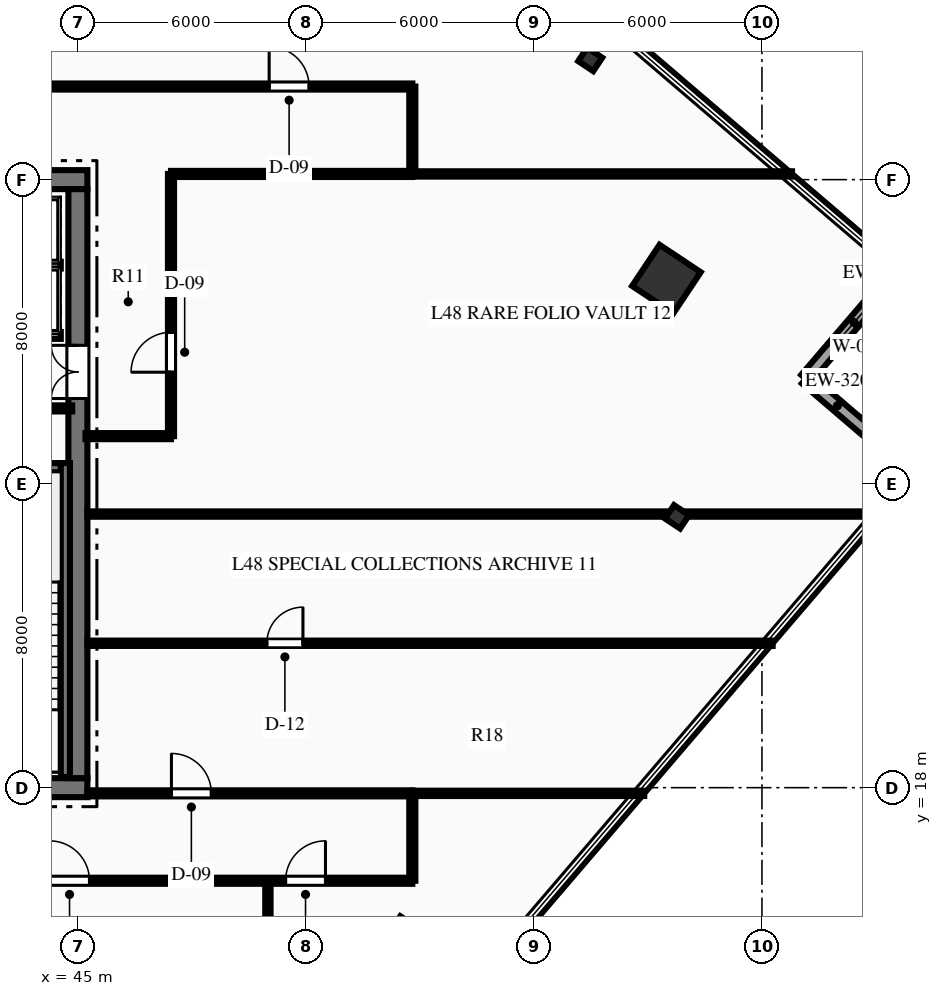
"""IFC4 building model, lengths in metres.
Left out: names, types, materials, properties, quantities, classifications, styles, units other than length and angle.
Written with IfcOpenShell. Run it as: python <this file> out.ifc"""

import sys

from ifc_helpers import new_model, si_unit, direction, frame, frame_2d, origin, origin_2d, place, context, subcontext, project, spatial, rectangle, hollow_rectangle, i_section, extrude, element, fill, save


model = new_model("IFC4")
c1 = context("Model", 3, precision=1e-05, world=origin(), true_north=direction((0.0, 1.0)))
c2 = subcontext(c1, "Body", "Model", "MODEL_VIEW")
j1 = project(units=[si_unit("LENGTHUNIT", "METRE"), si_unit("PLANEANGLEUNIT", "RADIAN")], contexts=[c1])
p1 = place(None, origin())
s1 = spatial("IfcSite", under=j1, at=p1, CompositionType="ELEMENT")
p2 = place(p1, origin())
s2 = spatial("IfcBuilding", under=s1, at=p2, CompositionType="ELEMENT")
p3 = place(p2, frame((0.0, 0.0, 193.95)))
s3 = spatial("IfcBuildingStorey", under=s2, at=p3, CompositionType="ELEMENT", Elevation=193.95)
p4 = place(p3, frame((26.75, 18.0, 0.0), z_axis=(0.0, 0.0, 1.0), x_axis=(1.0, 0.0, 0.0)))
e1 = element("IfcWall", 1, at=p4, inside=s3, PredefinedType="SHEAR", context=c2, shape_type="SweptSolid", body=[
    extrude(rectangle(XDim=18.5, YDim=0.5, at=frame_2d((9.25, 0.0))), origin(), (0.0, 0.0, 1.0), 4.5),
])
p5 = place(p4, frame((7.35, 0.0, 0.0)))
e2 = element("IfcOpeningElement", 2, at=p5, cuts=e1, PredefinedType="OPENING", context=c2, shape_type="SweptSolid", body=[
    extrude(rectangle(XDim=1.1, YDim=2.15, at=frame_2d((0.55, 1.075))), frame((0.0, 0.26, 0.0), z_axis=(0.0, -1.0, 0.0), x_axis=(1.0, 0.0, 0.0)), (0.0, 0.0, 1.0), 0.52),
])
p6 = place(p4, frame((10.05, 0.0, 0.0)))
e3 = element("IfcOpeningElement", 3, at=p6, cuts=e1, PredefinedType="OPENING", context=c2, shape_type="SweptSolid", body=[
    extrude(rectangle(XDim=1.1, YDim=2.15, at=frame_2d((0.55, 1.075))), frame((0.0, 0.26, 0.0), z_axis=(0.0, -1.0, 0.0), x_axis=(1.0, 0.0, 0.0)), (0.0, 0.0, 1.0), 0.52),
])
p7 = place(p3, frame((26.75, 34.0, 0.0), z_axis=(0.0, 0.0, 1.0), x_axis=(1.0, 0.0, 0.0)))
e4 = element("IfcWall", 4, at=p7, inside=s3, PredefinedType="SHEAR", context=c2, shape_type="SweptSolid", body=[
    extrude(rectangle(XDim=18.5, YDim=0.5, at=frame_2d((9.25, 0.0))), origin(), (0.0, 0.0, 1.0), 4.5),
])
p8 = place(p7, frame((13.935, 0.0, 0.0)))
e5 = element("IfcOpeningElement", 5, at=p8, cuts=e4, PredefinedType="OPENING", context=c2, shape_type="SweptSolid", body=[
    extrude(rectangle(XDim=1.1, YDim=2.15, at=frame_2d((0.55, 1.075))), frame((0.0, 0.26, 0.0), z_axis=(0.0, -1.0, 0.0), x_axis=(1.0, 0.0, 0.0)), (0.0, 0.0, 1.0), 0.52),
])
p9 = place(p7, frame((16.185, 0.0, 0.0)))
e6 = element("IfcOpeningElement", 6, at=p9, cuts=e4, PredefinedType="OPENING", context=c2, shape_type="SweptSolid", body=[
    extrude(rectangle(XDim=1.1, YDim=2.15, at=frame_2d((0.55, 1.075))), frame((0.0, 0.26, 0.0), z_axis=(0.0, -1.0, 0.0), x_axis=(1.0, 0.0, 0.0)), (0.0, 0.0, 1.0), 0.52),
])
p10 = place(p3, frame((45.0, 18.25, 0.0), z_axis=(0.0, 0.0, 1.0), x_axis=(0.0, 1.0, 0.0)))
e7 = element("IfcWall", 7, at=p10, inside=s3, PredefinedType="SHEAR", context=c2, shape_type="SweptSolid", body=[
    extrude(rectangle(XDim=15.5, YDim=0.5, at=frame_2d((7.75, 0.0))), origin(), (0.0, 0.0, 1.0), 4.5),
])
p11 = place(p10, frame((9.99, 0.0, 0.0)))
e8 = element("IfcOpeningElement", 8, at=p11, cuts=e7, PredefinedType="OPENING", context=c2, shape_type="SweptSolid", body=[
    extrude(rectangle(XDim=1.4, YDim=2.2, at=frame_2d((0.7, 1.1))), frame((0.0, 0.26, 0.0), z_axis=(0.0, -1.0, 0.0), x_axis=(1.0, 0.0, 0.0)), (0.0, 0.0, 1.0), 0.52),
])
p12 = place(p3, frame((40.81, 26.42, 0.0), z_axis=(0.0, 0.0, 1.0), x_axis=(1.0, 0.0, 0.0)))
e9 = element("IfcWall", 9, at=p12, inside=s3, PredefinedType="SHEAR", context=c2, shape_type="SweptSolid", body=[
    extrude(rectangle(XDim=3.98, YDim=0.24, at=frame_2d((1.99, 0.0))), origin(), (0.0, 0.0, 1.0), 4.5),
])
p13 = place(p3, frame((44.67, 18.28, 0.0), z_axis=(0.0, 0.0, 1.0), x_axis=(0.0, 1.0, 0.0)))
e10 = element("IfcWall", 10, at=p13, inside=s3, PredefinedType="SHEAR", context=c2, shape_type="SweptSolid", body=[
    extrude(rectangle(XDim=8.26, YDim=0.24, at=frame_2d((4.13, 0.0))), origin(), (0.0, 0.0, 1.0), 4.5),
])
p14 = place(p3, frame((60.486, 31.384, 0.0), z_axis=(0.0, 0.0, 1.0), x_axis=(0.554118199338, 0.832437998389, 0.0)))
e11 = element("IfcColumn", 11, at=p14, inside=s3, PredefinedType="COLUMN", context=c2, shape_type="SweptSolid", body=[
    extrude(hollow_rectangle(XDim=1.3, YDim=1.3, WallThickness=0.06, at=origin_2d()), origin(), (0.0, 0.0, 1.0), 4.5),
])
for number, where, z_axis, x_axis in (
    (12, (60.766, 25.126, 0.0), (0.0, 0.0, 1.0), (0.554, 0.832, 0.0)),
    (13, (58.481, 37.164, 0.0), (0.0, 0.0, 1.0), (0.554, 0.832, 0.0)),
):
    element("IfcColumn", number, at=place(p3, frame(where, z_axis=z_axis, x_axis=x_axis)), inside=s3, PredefinedType="COLUMN", context=c2, shape_type="SweptSolid", body=[
        extrude(i_section(OverallWidth=0.424, OverallDepth=0.474, WebThickness=0.048, FlangeThickness=0.077, at=origin_2d()), origin(), (0.0, 0.0, 1.0), 4.5),
    ])
p15 = place(p3, frame((64.155, 28.759, 0.0), z_axis=(0.0, 0.0, 1.0), x_axis=(0.759844000319, -0.650105449276, 0.0)))
e14 = element("IfcWall", 14, at=p15, inside=s3, PredefinedType="STANDARD", context=c2, shape_type="SweptSolid", body=[
    extrude(rectangle(XDim=3.9, YDim=0.32, at=frame_2d((1.95, 0.0))), origin(), (0.0, 0.0, 1.0), 4.22),
])
p16 = place(p3, frame((66.69, 31.722, 0.0), z_axis=(0.0, 0.0, 1.0), x_axis=(-0.650105449276, -0.759844000319, 0.0)))
e15 = element("IfcWall", 15, at=p16, inside=s3, PredefinedType="STANDARD", context=c2, shape_type="SweptSolid", body=[
    extrude(rectangle(XDim=3.9, YDim=0.32, at=frame_2d((1.95, 0.0))), origin(), (0.0, 0.0, 1.0), 4.22),
])
p17 = place(p16, frame((1.1, 0.0, 0.75)))
e16 = element("IfcOpeningElement", 16, at=p17, cuts=e15, PredefinedType="OPENING", context=c2, shape_type="SweptSolid", body=[
    extrude(rectangle(XDim=1.7, YDim=2.5, at=frame_2d((0.85, 1.25))), frame((0.0, 0.17, 0.0), z_axis=(0.0, -1.0, 0.0), x_axis=(1.0, 0.0, 0.0)), (0.0, 0.0, 1.0), 0.34),
])
p18 = place(p3, frame((40.8, 27.98, 0.0), z_axis=(0.0, 0.0, 1.0), x_axis=(1.0, 0.0, 0.0)))
e17 = element("IfcWall", 17, at=p18, inside=s3, PredefinedType="PARTITIONING", context=c2, shape_type="SweptSolid", body=[
    extrude(rectangle(XDim=4.05, YDim=0.16, at=frame_2d((2.025, 0.0))), origin(), (0.0, 0.0, 1.0), 4.22),
])
p19 = place(p18, frame((0.407, 0.0, 0.0)))
e18 = element("IfcOpeningElement", 18, at=p19, cuts=e17, PredefinedType="OPENING", context=c2, shape_type="SweptSolid", body=[
    extrude(rectangle(XDim=0.9, YDim=2.15, at=frame_2d((0.45, 1.075))), frame((0.0, 0.09, 0.0), z_axis=(0.0, -1.0, 0.0), x_axis=(1.0, 0.0, 0.0)), (0.0, 0.0, 1.0), 0.18),
])
p20 = place(p18, frame((2.2, 0.0, 0.0)))
e19 = element("IfcOpeningElement", 19, at=p20, cuts=e17, PredefinedType="OPENING", context=c2, shape_type="SweptSolid", body=[
    extrude(rectangle(XDim=0.9, YDim=2.15, at=frame_2d((0.45, 1.075))), frame((0.0, 0.09, 0.0), z_axis=(0.0, -1.0, 0.0), x_axis=(1.0, 0.0, 0.0)), (0.0, 0.0, 1.0), 0.18),
])
p21 = place(p3, frame((40.12, 29.9, 0.0), z_axis=(0.0, 0.0, 1.0), x_axis=(1.0, 0.0, 0.0)))
e20 = element("IfcWall", 20, at=p21, inside=s3, PredefinedType="PARTITIONING", context=c2, shape_type="SweptSolid", body=[
    extrude(rectangle(XDim=4.43, YDim=0.18, at=frame_2d((2.215, 0.0))), origin(), (0.0, 0.0, 1.0), 4.22),
])
p22 = place(p21, frame((0.565, 0.0, 0.0)))
e21 = element("IfcOpeningElement", 21, at=p22, cuts=e20, PredefinedType="OPENING", context=c2, shape_type="SweptSolid", body=[
    extrude(rectangle(XDim=1.1, YDim=2.15, at=frame_2d((0.55, 1.075))), frame((0.0, 0.1, 0.0), z_axis=(0.0, -1.0, 0.0), x_axis=(1.0, 0.0, 0.0)), (0.0, 0.0, 1.0), 0.2),
])
p23 = place(p21, frame((2.815, 0.0, 0.0)))
e22 = element("IfcOpeningElement", 22, at=p23, cuts=e20, PredefinedType="OPENING", context=c2, shape_type="SweptSolid", body=[
    extrude(rectangle(XDim=1.1, YDim=2.15, at=frame_2d((0.55, 1.075))), frame((0.0, 0.1, 0.0), z_axis=(0.0, -1.0, 0.0), x_axis=(1.0, 0.0, 0.0)), (0.0, 0.0, 1.0), 0.2),
])
p24 = place(p3, frame((40.12, 31.75, 0.0), z_axis=(0.0, 0.0, 1.0), x_axis=(1.0, 0.0, 0.0)))
e23 = element("IfcWall", 23, at=p24, inside=s3, PredefinedType="PARTITIONING", context=c2, shape_type="SweptSolid", body=[
    extrude(rectangle(XDim=4.43, YDim=0.18, at=frame_2d((2.215, 0.0))), origin(), (0.0, 0.0, 1.0), 4.22),
])
p25 = place(p3, frame((18.2, 15.55, 0.0), z_axis=(0.0, 0.0, 1.0), x_axis=(1.0, 0.0, 0.0)))
e24 = element("IfcWall", 24, at=p25, inside=s3, PredefinedType="PARTITIONING", context=c2, shape_type="SweptSolid", body=[
    extrude(rectangle(XDim=35.6, YDim=0.16, at=frame_2d((17.8, 0.0))), origin(), (0.0, 0.0, 1.0), 3.599),
])
p26 = place(p25, frame((2.625, 0.0, 0.0)))
e25 = element("IfcOpeningElement", 25, at=p26, cuts=e24, PredefinedType="OPENING", context=c2, shape_type="SweptSolid", body=[
    extrude(rectangle(XDim=1.05, YDim=2.15, at=frame_2d((0.525, 1.075))), frame((0.0, 0.09, 0.0), z_axis=(0.0, -1.0, 0.0), x_axis=(1.0, 0.0, 0.0)), (0.0, 0.0, 1.0), 0.18),
])
p27 = place(p25, frame((9.335, 0.0, 0.0)))
e26 = element("IfcOpeningElement", 26, at=p27, cuts=e24, PredefinedType="OPENING", context=c2, shape_type="SweptSolid", body=[
    extrude(rectangle(XDim=1.05, YDim=2.15, at=frame_2d((0.525, 1.075))), frame((0.0, 0.09, 0.0), z_axis=(0.0, -1.0, 0.0), x_axis=(1.0, 0.0, 0.0)), (0.0, 0.0, 1.0), 0.18),
])
p28 = place(p25, frame((17.775, 0.0, 0.0)))
e27 = element("IfcOpeningElement", 27, at=p28, cuts=e24, PredefinedType="OPENING", context=c2, shape_type="SweptSolid", body=[
    extrude(rectangle(XDim=1.05, YDim=2.15, at=frame_2d((0.525, 1.075))), frame((0.0, 0.09, 0.0), z_axis=(0.0, -1.0, 0.0), x_axis=(1.0, 0.0, 0.0)), (0.0, 0.0, 1.0), 0.18),
])
p29 = place(p25, frame((26.055, 0.0, 0.0)))
e28 = element("IfcOpeningElement", 28, at=p29, cuts=e24, PredefinedType="OPENING", context=c2, shape_type="SweptSolid", body=[
    extrude(rectangle(XDim=1.05, YDim=2.15, at=frame_2d((0.525, 1.075))), frame((0.0, 0.09, 0.0), z_axis=(0.0, -1.0, 0.0), x_axis=(1.0, 0.0, 0.0)), (0.0, 0.0, 1.0), 0.18),
])
p30 = place(p25, frame((32.265, 0.0, 0.0)))
e29 = element("IfcOpeningElement", 29, at=p30, cuts=e24, PredefinedType="OPENING", context=c2, shape_type="SweptSolid", body=[
    extrude(rectangle(XDim=1.05, YDim=2.15, at=frame_2d((0.525, 1.075))), frame((0.0, 0.09, 0.0), z_axis=(0.0, -1.0, 0.0), x_axis=(1.0, 0.0, 0.0)), (0.0, 0.0, 1.0), 0.18),
])
p31 = place(p3, frame((45.25, 17.85, 0.0), z_axis=(0.0, 0.0, 1.0), x_axis=(1.0, 0.0, 0.0)))
e30 = element("IfcWall", 30, at=p31, inside=s3, PredefinedType="PARTITIONING", context=c2, shape_type="SweptSolid", body=[
    extrude(rectangle(XDim=8.55, YDim=0.16, at=frame_2d((4.275, 0.0))), origin(), (0.0, 0.0, 1.0), 4.22),
])
p32 = place(p31, frame((2.211, 0.0, 0.0)))
e31 = element("IfcOpeningElement", 31, at=p32, cuts=e30, PredefinedType="OPENING", context=c2, shape_type="SweptSolid", body=[
    extrude(rectangle(XDim=1.05, YDim=2.15, at=frame_2d((0.525, 1.075))), frame((0.0, 0.09, 0.0), z_axis=(0.0, -1.0, 0.0), x_axis=(1.0, 0.0, 0.0)), (0.0, 0.0, 1.0), 0.18),
])
p33 = place(p3, frame((18.2, 36.45, 0.0), z_axis=(0.0, 0.0, 1.0), x_axis=(1.0, 0.0, 0.0)))
e32 = element("IfcWall", 32, at=p33, inside=s3, PredefinedType="PARTITIONING", context=c2, shape_type="SweptSolid", body=[
    extrude(rectangle(XDim=35.6, YDim=0.16, at=frame_2d((17.8, 0.0))), origin(), (0.0, 0.0, 1.0), 3.599),
])
p34 = place(p33, frame((7.55, 0.0, 0.0)))
e33 = element("IfcOpeningElement", 33, at=p34, cuts=e32, PredefinedType="OPENING", context=c2, shape_type="SweptSolid", body=[
    extrude(rectangle(XDim=0.9, YDim=2.15, at=frame_2d((0.45, 1.075))), frame((0.0, 0.09, 0.0), z_axis=(0.0, -1.0, 0.0), x_axis=(1.0, 0.0, 0.0)), (0.0, 0.0, 1.0), 0.18),
])
p35 = place(p33, frame((9.85, 0.0, 0.0)))
e34 = element("IfcOpeningElement", 34, at=p35, cuts=e32, PredefinedType="OPENING", context=c2, shape_type="SweptSolid", body=[
    extrude(rectangle(XDim=0.9, YDim=2.15, at=frame_2d((0.45, 1.075))), frame((0.0, 0.09, 0.0), z_axis=(0.0, -1.0, 0.0), x_axis=(1.0, 0.0, 0.0)), (0.0, 0.0, 1.0), 0.18),
])
p36 = place(p33, frame((12.1, 0.0, 0.0)))
e35 = element("IfcOpeningElement", 35, at=p36, cuts=e32, PredefinedType="OPENING", context=c2, shape_type="SweptSolid", body=[
    extrude(rectangle(XDim=1.0, YDim=2.15, at=frame_2d((0.5, 1.075))), frame((0.0, 0.09, 0.0), z_axis=(0.0, -1.0, 0.0), x_axis=(1.0, 0.0, 0.0)), (0.0, 0.0, 1.0), 0.18),
])
p37 = place(p33, frame((4.345, 0.0, 0.0)))
e36 = element("IfcOpeningElement", 36, at=p37, cuts=e32, PredefinedType="OPENING", context=c2, shape_type="SweptSolid", body=[
    extrude(rectangle(XDim=1.05, YDim=2.15, at=frame_2d((0.525, 1.075))), frame((0.0, 0.09, 0.0), z_axis=(0.0, -1.0, 0.0), x_axis=(1.0, 0.0, 0.0)), (0.0, 0.0, 1.0), 0.18),
])
p38 = place(p33, frame((18.049, 0.0, 0.0)))
e37 = element("IfcOpeningElement", 37, at=p38, cuts=e32, PredefinedType="OPENING", context=c2, shape_type="SweptSolid", body=[
    extrude(rectangle(XDim=1.05, YDim=2.15, at=frame_2d((0.525, 1.075))), frame((0.0, 0.09, 0.0), z_axis=(0.0, -1.0, 0.0), x_axis=(1.0, 0.0, 0.0)), (0.0, 0.0, 1.0), 0.18),
])
p39 = place(p33, frame((31.833, 0.0, 0.0)))
e38 = element("IfcOpeningElement", 38, at=p39, cuts=e32, PredefinedType="OPENING", context=c2, shape_type="SweptSolid", body=[
    extrude(rectangle(XDim=1.05, YDim=2.15, at=frame_2d((0.525, 1.075))), frame((0.0, 0.09, 0.0), z_axis=(0.0, -1.0, 0.0), x_axis=(1.0, 0.0, 0.0)), (0.0, 0.0, 1.0), 0.18),
])
p40 = place(p3, frame((47.45, 34.15, 0.0), z_axis=(0.0, 0.0, 1.0), x_axis=(1.0, 0.0, 0.0)))
e39 = element("IfcWall", 39, at=p40, inside=s3, PredefinedType="PARTITIONING", context=c2, shape_type="SweptSolid", body=[
    extrude(rectangle(XDim=6.35, YDim=0.16, at=frame_2d((3.175, 0.0))), origin(), (0.0, 0.0, 1.0), 4.22),
])
p41 = place(p3, frame((47.45, 27.25, 0.0), z_axis=(0.0, 0.0, 1.0), x_axis=(0.0, 1.0, 0.0)))
e40 = element("IfcWall", 40, at=p41, inside=s3, PredefinedType="PARTITIONING", context=c2, shape_type="SweptSolid", body=[
    extrude(rectangle(XDim=6.9, YDim=0.16, at=frame_2d((3.45, 0.0))), origin(), (0.0, 0.0, 1.0), 4.22),
])
p42 = place(p41, frame((1.683, 0.0, 0.0)))
e41 = element("IfcOpeningElement", 41, at=p42, cuts=e40, PredefinedType="OPENING", context=c2, shape_type="SweptSolid", body=[
    extrude(rectangle(XDim=1.05, YDim=2.15, at=frame_2d((0.525, 1.075))), frame((0.0, 0.09, 0.0), z_axis=(0.0, -1.0, 0.0), x_axis=(1.0, 0.0, 0.0)), (0.0, 0.0, 1.0), 0.18),
])
p43 = place(p3, frame((45.2, 27.25, 0.0), z_axis=(0.0, 0.0, 1.0), x_axis=(1.0, 0.0, 0.0)))
e42 = element("IfcWall", 42, at=p43, inside=s3, PredefinedType="PARTITIONING", context=c2, shape_type="SweptSolid", body=[
    extrude(rectangle(XDim=2.25, YDim=0.16, at=frame_2d((1.125, 0.0))), origin(), (0.0, 0.0, 1.0), 4.22),
])
for number, where, z_axis, x_axis in (
    (43, (53.8, 15.55, 0.0), (0.0, 0.0, 1.0), (0.0, 1.0, 0.0)),
    (44, (53.8, 34.15, 0.0), (0.0, 0.0, 1.0), (0.0, 1.0, 0.0)),
):
    element("IfcWall", number, at=place(p3, frame(where, z_axis=z_axis, x_axis=x_axis)), inside=s3, PredefinedType="PARTITIONING", context=c2, shape_type="SweptSolid", body=[
        extrude(rectangle(XDim=2.3, YDim=0.16, at=frame_2d((1.15, 0.0))), origin(), (0.0, 0.0, 1.0), 4.22),
    ])
p44 = place(p3, frame((53.8, 17.85, 0.0), z_axis=(0.0, 0.0, 1.0), x_axis=(1.0, 0.0, 0.0)))
e45 = element("IfcWall", 45, at=p44, inside=s3, PredefinedType="PARTITIONING", context=c2, shape_type="SweptSolid", body=[
    extrude(rectangle(XDim=6.102, YDim=0.14, at=frame_2d((3.051, 0.0))), origin(), (0.0, 0.0, 1.0), 4.22),
])
p45 = place(p3, frame((53.8, 34.15, 0.0), z_axis=(0.0, 0.0, 1.0), x_axis=(1.0, 0.0, 0.0)))
e46 = element("IfcWall", 46, at=p45, inside=s3, PredefinedType="PARTITIONING", context=c2, shape_type="SweptSolid", body=[
    extrude(rectangle(XDim=9.991, YDim=0.14, at=frame_2d((4.996, 0.0))), origin(), (0.0, 0.0, 1.0), 4.22),
])
p46 = place(p3, frame((50.0, 6.277, 0.0), z_axis=(0.0, 0.0, 1.0), x_axis=(0.0, 1.0, 0.0)))
e47 = element("IfcWall", 47, at=p46, inside=s3, PredefinedType="PARTITIONING", context=c2, shape_type="SweptSolid", body=[
    extrude(rectangle(XDim=9.273, YDim=0.14, at=frame_2d((4.637, 0.0))), origin(), (0.0, 0.0, 1.0), 4.22),
])
p47 = place(p3, frame((45.25, 21.8, 0.0), z_axis=(0.0, 0.0, 1.0), x_axis=(1.0, 0.0, 0.0)))
e48 = element("IfcWall", 48, at=p47, inside=s3, PredefinedType="PARTITIONING", context=c2, shape_type="SweptSolid", body=[
    extrude(rectangle(XDim=18.031, YDim=0.14, at=frame_2d((9.016, 0.0))), origin(), (0.0, 0.0, 1.0), 4.22),
])
p48 = place(p47, frame((4.722, 0.0, 0.0)))
e49 = element("IfcOpeningElement", 49, at=p48, cuts=e48, PredefinedType="OPENING", context=c2, shape_type="SweptSolid", body=[
    extrude(rectangle(XDim=0.95, YDim=2.15, at=frame_2d((0.475, 1.075))), frame((0.0, 0.08, 0.0), z_axis=(0.0, -1.0, 0.0), x_axis=(1.0, 0.0, 0.0)), (0.0, 0.0, 1.0), 0.16),
])
p49 = place(p3, frame((45.25, 25.2, 0.0), z_axis=(0.0, 0.0, 1.0), x_axis=(1.0, 0.0, 0.0)))
e50 = element("IfcWall", 50, at=p49, inside=s3, PredefinedType="PARTITIONING", context=c2, shape_type="SweptSolid", body=[
    extrude(rectangle(XDim=20.94, YDim=0.14, at=frame_2d((10.47, 0.0))), origin(), (0.0, 0.0, 1.0), 3.758),
])
p50 = place(p17, origin())
e51 = element("IfcWindow", 51, at=p50, inside=s3, PartitioningType="SINGLE_PANEL", PredefinedType="WINDOW", context=c2, shape_type="SweptSolid", body=[
    extrude(rectangle(XDim=1.7, YDim=2.5, at=frame_2d((0.85, 1.25))), frame((0.0, 0.03, 0.0), z_axis=(0.0, -1.0, 0.0), x_axis=(1.0, 0.0, 0.0)), (0.0, 0.0, 1.0), 0.06),
])
fill(e16, e51)
p51 = place(p11, origin())
e52 = element("IfcDoor", 52, at=p51, inside=s3, OperationType="DOUBLE_DOOR_SINGLE_SWING", PredefinedType="DOOR", context=c2, shape_type="SweptSolid", body=[
    extrude(rectangle(XDim=1.4, YDim=2.2, at=frame_2d((0.7, 1.1))), frame((0.0, 0.025, 0.0), z_axis=(0.0, -1.0, 0.0), x_axis=(1.0, 0.0, 0.0)), (0.0, 0.0, 1.0), 0.05),
])
fill(e8, e52)
p52 = place(p29, origin())
e53 = element("IfcDoor", 53, at=p52, inside=s3, OperationType="SINGLE_SWING_LEFT", PredefinedType="DOOR", context=c2, shape_type="SweptSolid", body=[
    extrude(rectangle(XDim=1.05, YDim=2.15, at=frame_2d((0.525, 1.075))), frame((0.0, 0.025, 0.0), z_axis=(0.0, -1.0, 0.0), x_axis=(1.0, 0.0, 0.0)), (0.0, 0.0, 1.0), 0.05),
])
fill(e28, e53)
p53 = place(p30, origin())
e54 = element("IfcDoor", 54, at=p53, inside=s3, OperationType="SINGLE_SWING_RIGHT", PredefinedType="DOOR", context=c2, shape_type="SweptSolid", body=[
    extrude(rectangle(XDim=1.05, YDim=2.15, at=frame_2d((0.525, 1.075))), frame((0.0, 0.025, 0.0), z_axis=(0.0, -1.0, 0.0), x_axis=(1.0, 0.0, 0.0)), (0.0, 0.0, 1.0), 0.05),
])
fill(e29, e54)
p54 = place(p39, origin())
e55 = element("IfcDoor", 55, at=p54, inside=s3, OperationType="SINGLE_SWING_LEFT", PredefinedType="DOOR", context=c2, shape_type="SweptSolid", body=[
    extrude(rectangle(XDim=1.05, YDim=2.15, at=frame_2d((0.525, 1.075))), frame((0.0, 0.025, 0.0), z_axis=(0.0, -1.0, 0.0), x_axis=(1.0, 0.0, 0.0)), (0.0, 0.0, 1.0), 0.05),
])
fill(e38, e55)
p55 = place(p32, origin())
e56 = element("IfcDoor", 56, at=p55, inside=s3, OperationType="SINGLE_SWING_LEFT", PredefinedType="DOOR", context=c2, shape_type="SweptSolid", body=[
    extrude(rectangle(XDim=1.05, YDim=2.15, at=frame_2d((0.525, 1.075))), frame((0.0, 0.025, 0.0), z_axis=(0.0, -1.0, 0.0), x_axis=(1.0, 0.0, 0.0)), (0.0, 0.0, 1.0), 0.05),
])
fill(e31, e56)
p56 = place(p48, origin())
e57 = element("IfcDoor", 57, at=p56, inside=s3, OperationType="SINGLE_SWING_RIGHT", PredefinedType="DOOR", context=c2, shape_type="SweptSolid", body=[
    extrude(rectangle(XDim=0.95, YDim=2.15, at=frame_2d((0.475, 1.075))), frame((0.0, 0.025, 0.0), z_axis=(0.0, -1.0, 0.0), x_axis=(1.0, 0.0, 0.0)), (0.0, 0.0, 1.0), 0.05),
])
fill(e49, e57)
p57 = place(p42, origin())
e58 = element("IfcDoor", 58, at=p57, inside=s3, OperationType="SINGLE_SWING_LEFT", PredefinedType="DOOR", context=c2, shape_type="SweptSolid", body=[
    extrude(rectangle(XDim=1.05, YDim=2.15, at=frame_2d((0.525, 1.075))), frame((0.0, 0.025, 0.0), z_axis=(0.0, -1.0, 0.0), x_axis=(1.0, 0.0, 0.0)), (0.0, 0.0, 1.0), 0.05),
])
fill(e41, e58)
save(model, sys.argv[1])
